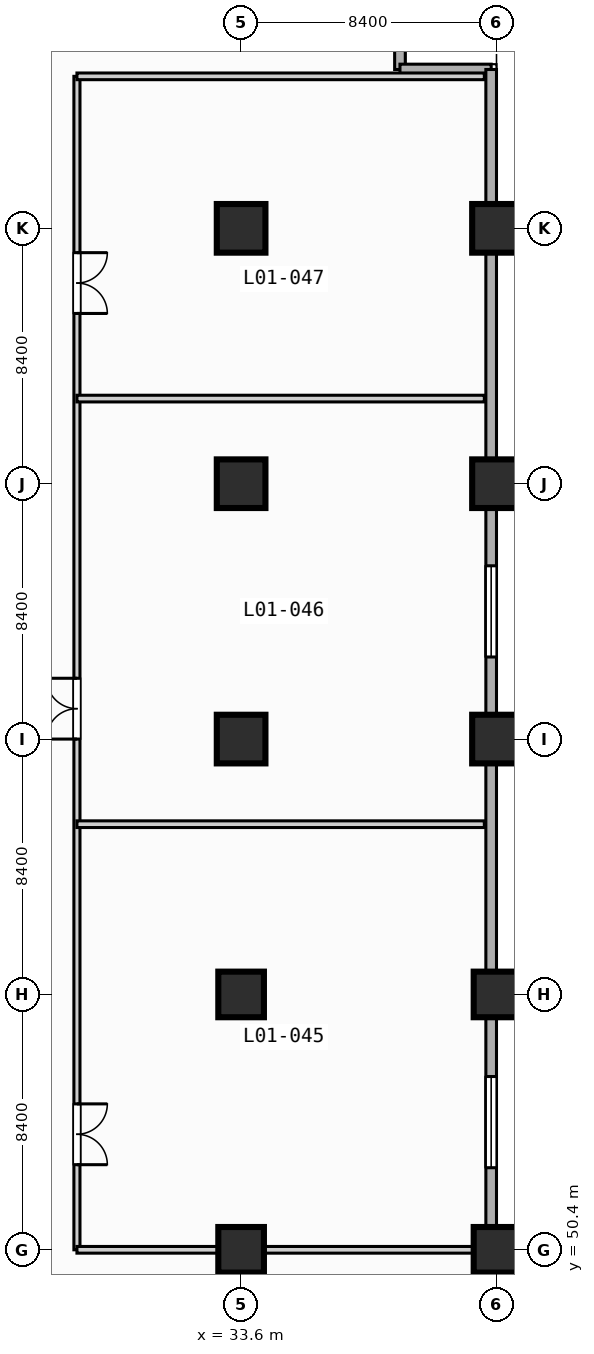
"""IFC4 building model, lengths in metres.
Left out: names, types, materials, properties, quantities, classifications, styles, units other than length and angle.
Written with IfcOpenShell. Run it as: python <this file> out.ifc"""

import sys

from ifc_helpers import new_model, si_unit, direction, frame, frame_2d, origin, origin_2d, place, context, subcontext, project, spatial, rectangle, extrude, element, fill, save


model = new_model("IFC4")
c1 = context("Model", 3, precision=1e-05, world=origin(), true_north=direction((0.0, 1.0)))
c2 = subcontext(c1, "Body", "Model", "MODEL_VIEW")
j1 = project(units=[si_unit("LENGTHUNIT", "METRE"), si_unit("PLANEANGLEUNIT", "RADIAN")], contexts=[c1])
p1 = place(None, origin())
s1 = spatial("IfcSite", under=j1, at=p1, CompositionType="ELEMENT")
p2 = place(p1, origin())
s2 = spatial("IfcBuilding", under=s1, at=p2, CompositionType="ELEMENT")
p3 = place(p2, frame((0.0, 0.0, 6.0)))
s3 = spatial("IfcBuildingStorey", under=s2, at=p3, CompositionType="ELEMENT", Elevation=6.0)
for number, where, z_axis, x_axis in (
    (1, (33.6, 50.4, 0.0), (0.0, 0.0, 1.0), (1.0, 0.0, 0.0)),
    (2, (33.6, 58.8, 0.0), (0.0, 0.0, 1.0), (1.0, 0.0, 0.0)),
):
    element("IfcColumn", number, at=place(p3, frame(where, z_axis=z_axis, x_axis=x_axis)), inside=s3, PredefinedType="COLUMN", context=c2, shape_type="SweptSolid", body=[
        extrude(rectangle(XDim=1.5, YDim=1.5, at=origin_2d()), origin(), (0.0, 0.0, 1.0), 4.8),
    ])
for number, where, z_axis, x_axis in (
    (3, (33.6, 67.2, 0.0), (0.0, 0.0, 1.0), (1.0, 0.0, 0.0)),
    (4, (33.6, 75.6, 0.0), (0.0, 0.0, 1.0), (1.0, 0.0, 0.0)),
    (5, (33.6, 84.0, 0.0), (0.0, 0.0, 1.0), (1.0, 0.0, 0.0)),
):
    element("IfcColumn", number, at=place(p3, frame(where, z_axis=z_axis, x_axis=x_axis)), inside=s3, PredefinedType="COLUMN", context=c2, shape_type="SweptSolid", body=[
        extrude(rectangle(XDim=1.6, YDim=1.6, at=origin_2d()), origin(), (0.0, 0.0, 1.0), 4.8),
    ])
for number, where, z_axis, x_axis in (
    (6, (42.0, 50.4, 0.0), (0.0, 0.0, 1.0), (1.0, 0.0, 0.0)),
    (7, (42.0, 58.8, 0.0), (0.0, 0.0, 1.0), (1.0, 0.0, 0.0)),
):
    element("IfcColumn", number, at=place(p3, frame(where, z_axis=z_axis, x_axis=x_axis)), inside=s3, PredefinedType="COLUMN", context=c2, shape_type="SweptSolid", body=[
        extrude(rectangle(XDim=1.5, YDim=1.5, at=origin_2d()), origin(), (0.0, 0.0, 1.0), 4.8),
    ])
for number, where, z_axis, x_axis in (
    (8, (42.0, 67.2, 0.0), (0.0, 0.0, 1.0), (1.0, 0.0, 0.0)),
    (9, (42.0, 75.6, 0.0), (0.0, 0.0, 1.0), (1.0, 0.0, 0.0)),
    (10, (42.0, 84.0, 0.0), (0.0, 0.0, 1.0), (1.0, 0.0, 0.0)),
):
    element("IfcColumn", number, at=place(p3, frame(where, z_axis=z_axis, x_axis=x_axis)), inside=s3, PredefinedType="COLUMN", context=c2, shape_type="SweptSolid", body=[
        extrude(rectangle(XDim=1.6, YDim=1.6, at=origin_2d()), origin(), (0.0, 0.0, 1.0), 4.8),
    ])
for number, where, z_axis, x_axis in (
    (11, (38.825, 92.225, 0.0), (0.0, 0.0, 1.0), (0.0, -1.0, 0.0)),
    (12, (38.825, 89.225, 0.0), (0.0, 0.0, 1.0), (1.0, 0.0, 0.0)),
):
    element("IfcWall", number, at=place(p3, frame(where, z_axis=z_axis, x_axis=x_axis)), inside=s3, PredefinedType="STANDARD", context=c2, shape_type="SweptSolid", body=[
        extrude(rectangle(XDim=3.0, YDim=0.35, at=frame_2d((1.5, 0.0))), origin(), (0.0, 0.0, 1.0), 4.45),
    ])
p4 = place(p3, frame((41.825, 89.225, 0.0), z_axis=(0.0, 0.0, 1.0), x_axis=(0.0, -1.0, 0.0)))
e13 = element("IfcWall", 13, at=p4, inside=s3, PredefinedType="STANDARD", context=c2, shape_type="SweptSolid", body=[
    extrude(rectangle(XDim=47.4, YDim=0.35, at=frame_2d((23.7, 0.0))), origin(), (0.0, 0.0, 1.0), 4.45),
])
p5 = place(p4, frame((33.125, 0.0, 0.85)))
e14 = element("IfcOpeningElement", 14, at=p5, cuts=e13, PredefinedType="OPENING", context=c2, shape_type="SweptSolid", body=[
    extrude(rectangle(XDim=3.0, YDim=2.4, at=frame_2d((1.5, 1.2))), frame((0.0, 0.185, 0.0), z_axis=(0.0, -1.0, 0.0), x_axis=(1.0, 0.0, 0.0)), (0.0, 0.0, 1.0), 0.37),
])
p6 = place(p4, frame((16.325, 0.0, 0.85)))
e15 = element("IfcOpeningElement", 15, at=p6, cuts=e13, PredefinedType="OPENING", context=c2, shape_type="SweptSolid", body=[
    extrude(rectangle(XDim=3.0, YDim=2.4, at=frame_2d((1.5, 1.2))), frame((0.0, 0.185, 0.0), z_axis=(0.0, -1.0, 0.0), x_axis=(1.0, 0.0, 0.0)), (0.0, 0.0, 1.0), 0.37),
])
p7 = place(p3, frame((28.2, 50.4, 0.0), z_axis=(0.0, 0.0, 1.0), x_axis=(0.0, 1.0, 0.0)))
e16 = element("IfcWall", 16, at=p7, inside=s3, PredefinedType="PARTITIONING", context=c2, shape_type="SweptSolid", body=[
    extrude(rectangle(XDim=38.6, YDim=0.2, at=frame_2d((19.3, 0.0))), origin(), (0.0, 0.0, 1.0), 4.45),
])
p8 = place(p7, frame((2.8, 0.0, 0.0)))
e17 = element("IfcOpeningElement", 17, at=p8, cuts=e16, PredefinedType="OPENING", context=c2, shape_type="SweptSolid", body=[
    extrude(rectangle(XDim=2.0, YDim=2.15, at=frame_2d((1.0, 1.075))), frame((0.0, 0.11, 0.0), z_axis=(0.0, -1.0, 0.0), x_axis=(1.0, 0.0, 0.0)), (0.0, 0.0, 1.0), 0.22),
])
p9 = place(p7, frame((16.8, 0.0, 0.0)))
e18 = element("IfcOpeningElement", 18, at=p9, cuts=e16, PredefinedType="OPENING", context=c2, shape_type="SweptSolid", body=[
    extrude(rectangle(XDim=2.0, YDim=2.15, at=frame_2d((1.0, 1.075))), frame((0.0, 0.11, 0.0), z_axis=(0.0, -1.0, 0.0), x_axis=(1.0, 0.0, 0.0)), (0.0, 0.0, 1.0), 0.22),
])
p10 = place(p7, frame((30.8, 0.0, 0.0)))
e19 = element("IfcOpeningElement", 19, at=p10, cuts=e16, PredefinedType="OPENING", context=c2, shape_type="SweptSolid", body=[
    extrude(rectangle(XDim=2.0, YDim=2.15, at=frame_2d((1.0, 1.075))), frame((0.0, 0.11, 0.0), z_axis=(0.0, -1.0, 0.0), x_axis=(1.0, 0.0, 0.0)), (0.0, 0.0, 1.0), 0.22),
])
p11 = place(p3, frame((28.2, 50.4, 0.0), z_axis=(0.0, 0.0, 1.0), x_axis=(1.0, 0.0, 0.0)))
e20 = element("IfcWall", 20, at=p11, inside=s3, PredefinedType="PARTITIONING", context=c2, shape_type="SweptSolid", body=[
    extrude(rectangle(XDim=13.4, YDim=0.22, at=frame_2d((6.7, 0.0))), origin(), (0.0, 0.0, 1.0), 3.6),
])
for number, where, z_axis, x_axis in (
    (21, (28.2, 64.4, 0.0), (0.0, 0.0, 1.0), (1.0, 0.0, 0.0)),
    (22, (28.2, 78.4, 0.0), (0.0, 0.0, 1.0), (1.0, 0.0, 0.0)),
    (23, (28.2, 89.0, 0.0), (0.0, 0.0, 1.0), (1.0, 0.0, 0.0)),
):
    element("IfcWall", number, at=place(p3, frame(where, z_axis=z_axis, x_axis=x_axis)), inside=s3, PredefinedType="PARTITIONING", context=c2, shape_type="SweptSolid", body=[
        extrude(rectangle(XDim=13.4, YDim=0.22, at=frame_2d((6.7, 0.0))), origin(), (0.0, 0.0, 1.0), 4.45),
    ])
p12 = place(p5, origin())
e24 = element("IfcWindow", 24, at=p12, inside=s3, PartitioningType="SINGLE_PANEL", PredefinedType="WINDOW", context=c2, shape_type="SweptSolid", body=[
    extrude(rectangle(XDim=3.0, YDim=2.4, at=frame_2d((1.5, 1.2))), frame((0.0, 0.03, 0.0), z_axis=(0.0, -1.0, 0.0), x_axis=(1.0, 0.0, 0.0)), (0.0, 0.0, 1.0), 0.06),
])
fill(e14, e24)
p13 = place(p6, origin())
e25 = element("IfcWindow", 25, at=p13, inside=s3, PartitioningType="SINGLE_PANEL", PredefinedType="WINDOW", context=c2, shape_type="SweptSolid", body=[
    extrude(rectangle(XDim=3.0, YDim=2.4, at=frame_2d((1.5, 1.2))), frame((0.0, 0.03, 0.0), z_axis=(0.0, -1.0, 0.0), x_axis=(1.0, 0.0, 0.0)), (0.0, 0.0, 1.0), 0.06),
])
fill(e15, e25)
p14 = place(p8, origin())
e26 = element("IfcDoor", 26, at=p14, inside=s3, OperationType="SINGLE_SWING_RIGHT", PredefinedType="DOOR", context=c2, shape_type="SweptSolid", body=[
    extrude(rectangle(XDim=2.0, YDim=2.15, at=frame_2d((1.0, 1.075))), frame((0.0, 0.025, 0.0), z_axis=(0.0, -1.0, 0.0), x_axis=(1.0, 0.0, 0.0)), (0.0, 0.0, 1.0), 0.05),
])
fill(e17, e26)
p15 = place(p9, origin())
e27 = element("IfcDoor", 27, at=p15, inside=s3, OperationType="SINGLE_SWING_LEFT", PredefinedType="DOOR", context=c2, shape_type="SweptSolid", body=[
    extrude(rectangle(XDim=2.0, YDim=2.15, at=frame_2d((1.0, 1.075))), frame((0.0, 0.025, 0.0), z_axis=(0.0, -1.0, 0.0), x_axis=(1.0, 0.0, 0.0)), (0.0, 0.0, 1.0), 0.05),
])
fill(e18, e27)
p16 = place(p10, origin())
e28 = element("IfcDoor", 28, at=p16, inside=s3, OperationType="SINGLE_SWING_RIGHT", PredefinedType="DOOR", context=c2, shape_type="SweptSolid", body=[
    extrude(rectangle(XDim=2.0, YDim=2.15, at=frame_2d((1.0, 1.075))), frame((0.0, 0.025, 0.0), z_axis=(0.0, -1.0, 0.0), x_axis=(1.0, 0.0, 0.0)), (0.0, 0.0, 1.0), 0.05),
])
fill(e19, e28)
save(model, sys.argv[1])
